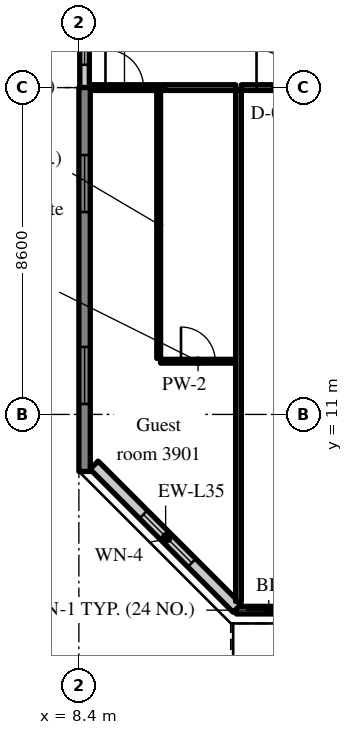
"""IFC4 building model, lengths in metres.
Left out: names, types, materials, properties, quantities, classifications, styles, units other than length and angle.
Written with IfcOpenShell. Run it as: python <this file> out.ifc"""

import sys

from ifc_helpers import new_model, si_unit, direction, frame, frame_2d, origin, place, context, subcontext, project, spatial, rectangle, extrude, source, transform, mapped, element, fill, save


model = new_model("IFC4")
c1 = context("Model", 3, precision=1e-05, world=origin(), true_north=direction((0.0, 1.0)))
c2 = subcontext(c1, "Body", "Model", "MODEL_VIEW")
j1 = project(units=[si_unit("LENGTHUNIT", "METRE"), si_unit("PLANEANGLEUNIT", "RADIAN")], contexts=[c1])
p1 = place(None, origin())
s1 = spatial("IfcSite", under=j1, at=p1, CompositionType="ELEMENT")
p2 = place(p1, origin())
s2 = spatial("IfcBuilding", under=s1, at=p2, CompositionType="ELEMENT")
p3 = place(p2, frame((0.0, 0.0, 163.0)))
s3 = spatial("IfcBuildingStorey", under=s2, at=p3, CompositionType="ELEMENT", Elevation=163.0)
m1 = source(origin(), c2, "Body", "SweptSolid", [
    extrude(rectangle(XDim=10.1, YDim=0.3, at=frame_2d((5.05, 0.0))), origin(), (0.0, 0.0, 1.0), 3.52),
])
p4 = place(p3, frame((8.55, 9.5, 0.0), z_axis=(0.0, 0.0, 1.0), x_axis=(0.0, 1.0, 0.0)))
e1 = element("IfcWall", 1, at=p4, inside=s3, PredefinedType="SHEAR", context=c2, shape_type="MappedRepresentation", body=[
    mapped(m1, transform((0.0, 0.0, 0.0), scale=1.0)),
])
m2 = source(origin(), c2, "Body", "SweptSolid", [
    extrude(rectangle(XDim=1.5, YDim=1.5, at=frame_2d((0.75, 0.75))), frame((0.0, 0.16, 0.0), z_axis=(0.0, -1.0, 0.0), x_axis=(1.0, 0.0, 0.0)), (0.0, 0.0, 1.0), 0.32),
])
p5 = place(p4, frame((1.775, 0.0, 0.9)))
e2 = element("IfcOpeningElement", 2, at=p5, cuts=e1, PredefinedType="OPENING", context=c2, shape_type="MappedRepresentation", body=[
    mapped(m2, transform((0.0, 0.0, 0.0), scale=1.0)),
])
p6 = place(p4, frame((6.825, 0.0, 0.9)))
e3 = element("IfcOpeningElement", 3, at=p6, cuts=e1, PredefinedType="OPENING", context=c2, shape_type="MappedRepresentation", body=[
    mapped(m2, transform((0.0, 0.0, 0.0), scale=1.0)),
])
m3 = source(origin(), c2, "Body", "SweptSolid", [
    extrude(rectangle(XDim=4.105, YDim=0.2, at=frame_2d((2.052, 0.0))), origin(), (0.0, 0.0, 1.0), 2.87),
])
p7 = place(p3, frame((12.545, 5.85, 0.0), z_axis=(0.0, 0.0, 1.0), x_axis=(1.0, 0.0, 0.0)))
e4 = element("IfcWall", 4, at=p7, inside=s3, PredefinedType="SOLIDWALL", context=c2, shape_type="MappedRepresentation", body=[
    mapped(m3, transform((0.0, 0.0, 0.0), scale=1.0)),
])
m4 = source(origin(), c2, "Body", "SweptSolid", [
    extrude(rectangle(XDim=1.2, YDim=2.4, at=frame_2d((0.6, 1.2))), frame((0.0, 0.11, 0.0), z_axis=(0.0, -1.0, 0.0), x_axis=(1.0, 0.0, 0.0)), (0.0, 0.0, 1.0), 0.22),
])
p8 = place(p7, frame((0.25, 0.0, 0.0)))
e5 = element("IfcOpeningElement", 5, at=p8, cuts=e4, PredefinedType="OPENING", context=c2, shape_type="MappedRepresentation", body=[
    mapped(m4, transform((0.0, 0.0, 0.0), scale=1.0)),
])
m5 = source(origin(), c2, "Body", "SweptSolid", [
    extrude(rectangle(XDim=1.5, YDim=1.5, at=frame_2d((0.75, 0.75))), frame((0.0, 0.11, 0.0), z_axis=(0.0, -1.0, 0.0), x_axis=(1.0, 0.0, 0.0)), (0.0, 0.0, 1.0), 0.22),
])
p9 = place(p7, frame((2.355, 0.0, 0.9)))
e6 = element("IfcOpeningElement", 6, at=p9, cuts=e4, PredefinedType="OPENING", context=c2, shape_type="MappedRepresentation", body=[
    mapped(m5, transform((0.0, 0.0, 0.0), scale=1.0)),
])
m6 = source(origin(), c2, "Body", "SweptSolid", [
    extrude(rectangle(XDim=5.326, YDim=0.3, at=frame_2d((2.663, 0.0))), origin(), (0.0, 0.0, 1.0), 3.52),
])
p10 = place(p3, frame((8.8, 9.666, 0.0), z_axis=(0.0, 0.0, 1.0), x_axis=(0.707083859269, -0.707129702361, 0.0)))
e7 = element("IfcWall", 7, at=p10, inside=s3, PredefinedType="SOLIDWALL", context=c2, shape_type="MappedRepresentation", body=[
    mapped(m6, transform((0.0, 0.0, 0.0), scale=1.0)),
])
m7 = source(origin(), c2, "Body", "SweptSolid", [
    extrude(rectangle(XDim=1.8, YDim=1.5, at=frame_2d((0.9, 0.75))), frame((0.0, 0.16, 0.0), z_axis=(0.0, -1.0, 0.0), x_axis=(1.0, 0.0, 0.0)), (0.0, 0.0, 1.0), 0.32),
])
p11 = place(p10, frame((1.836, 0.0, 0.9)))
e8 = element("IfcOpeningElement", 8, at=p11, cuts=e7, PredefinedType="OPENING", context=c2, shape_type="MappedRepresentation", body=[
    mapped(m7, transform((0.0, 0.0, 0.0), scale=1.0)),
])
m8 = source(origin(), c2, "Body", "SweptSolid", [
    extrude(rectangle(XDim=2.4, YDim=0.25, at=frame_2d((1.2, 0.0))), origin(), (0.0, 0.0, 1.0), 2.62),
])
p12 = place(p3, frame((8.55, 19.6, 0.0), z_axis=(0.0, 0.0, 1.0), x_axis=(0.0, 1.0, 0.0)))
e9 = element("IfcWall", 9, at=p12, inside=s3, PredefinedType="SOLIDWALL", context=c2, shape_type="MappedRepresentation", body=[
    mapped(m8, transform((0.0, 0.0, 0.0), scale=1.0)),
])
m9 = source(origin(), c2, "Body", "SweptSolid", [
    extrude(rectangle(XDim=1.2, YDim=1.5, at=frame_2d((0.6, 0.75))), frame((0.0, 0.135, 0.0), z_axis=(0.0, -1.0, 0.0), x_axis=(1.0, 0.0, 0.0)), (0.0, 0.0, 1.0), 0.27),
])
p13 = place(p12, frame((0.6, 0.0, 0.9)))
e10 = element("IfcOpeningElement", 10, at=p13, cuts=e9, PredefinedType="OPENING", context=c2, shape_type="MappedRepresentation", body=[
    mapped(m9, transform((0.0, 0.0, 0.0), scale=1.0)),
])
m10 = source(origin(), c2, "Body", "SweptSolid", [
    extrude(rectangle(XDim=7.05, YDim=0.1, at=frame_2d((3.525, 0.0))), origin(), (0.0, 0.0, 1.0), 3.52),
])
p14 = place(p3, frame((10.5, 12.475, 0.0), z_axis=(0.0, 0.0, 1.0), x_axis=(0.0, 1.0, 0.0)))
e11 = element("IfcWall", 11, at=p14, inside=s3, PredefinedType="PARTITIONING", context=c2, shape_type="MappedRepresentation", body=[
    mapped(m10, transform((0.0, 0.0, 0.0), scale=1.0)),
])
m11 = source(origin(), c2, "Body", "SweptSolid", [
    extrude(rectangle(XDim=1.975, YDim=0.1, at=frame_2d((0.987, 0.0))), origin(), (0.0, 0.0, 1.0), 3.52),
])
p15 = place(p3, frame((10.55, 12.4, 0.0), z_axis=(0.0, 0.0, 1.0), x_axis=(1.0, 0.0, 0.0)))
e12 = element("IfcWall", 12, at=p15, inside=s3, PredefinedType="PARTITIONING", context=c2, shape_type="MappedRepresentation", body=[
    mapped(m11, transform((0.0, 0.0, 0.0), scale=1.0)),
])
m12 = source(origin(), c2, "Body", "SweptSolid", [
    extrude(rectangle(XDim=0.9, YDim=2.1, at=frame_2d((0.45, 1.05))), frame((0.0, 0.06, 0.0), z_axis=(0.0, -1.0, 0.0), x_axis=(1.0, 0.0, 0.0)), (0.0, 0.0, 1.0), 0.12),
])
p16 = place(p15, frame((0.538, 0.0, 0.0)))
e13 = element("IfcOpeningElement", 13, at=p16, cuts=e12, PredefinedType="OPENING", context=c2, shape_type="MappedRepresentation", body=[
    mapped(m12, transform((0.0, 0.0, 0.0), scale=1.0)),
])
m13 = source(origin(), c2, "Body", "SweptSolid", [
    extrude(rectangle(XDim=3.825, YDim=0.15, at=frame_2d((1.913, 0.0))), origin(), (0.0, 0.0, 1.0), 2.82),
])
p17 = place(p3, frame((8.7, 19.6, 0.0), z_axis=(0.0, 0.0, 1.0), x_axis=(1.0, 0.0, 0.0)))
e14 = element("IfcWall", 14, at=p17, inside=s3, PredefinedType="PARTITIONING", context=c2, shape_type="MappedRepresentation", body=[
    mapped(m13, transform((0.0, 0.0, 0.0), scale=1.0)),
])
m14 = source(origin(), c2, "Body", "SweptSolid", [
    extrude(rectangle(XDim=1.0, YDim=2.1, at=frame_2d((0.5, 1.05))), frame((0.0, 0.085, 0.0), z_axis=(0.0, -1.0, 0.0), x_axis=(1.0, 0.0, 0.0)), (0.0, 0.0, 1.0), 0.17),
])
p18 = place(p17, frame((0.4, 0.0, 0.0)))
e15 = element("IfcOpeningElement", 15, at=p18, cuts=e14, PredefinedType="OPENING", context=c2, shape_type="MappedRepresentation", body=[
    mapped(m14, transform((0.0, 0.0, 0.0), scale=1.0)),
])
m15 = source(origin(), c2, "Body", "SweptSolid", [
    extrude(rectangle(XDim=3.975, YDim=0.15, at=frame_2d((1.987, 0.0))), origin(), (0.0, 0.0, 1.0), 2.82),
])
p19 = place(p3, frame((12.675, 19.6, 0.0), z_axis=(0.0, 0.0, 1.0), x_axis=(1.0, 0.0, 0.0)))
e16 = element("IfcWall", 16, at=p19, inside=s3, PredefinedType="PARTITIONING", context=c2, shape_type="MappedRepresentation", body=[
    mapped(m15, transform((0.0, 0.0, 0.0), scale=1.0)),
])
p20 = place(p19, frame((0.4, 0.0, 0.0)))
e17 = element("IfcOpeningElement", 17, at=p20, cuts=e16, PredefinedType="OPENING", context=c2, shape_type="MappedRepresentation", body=[
    mapped(m14, transform((0.0, 0.0, 0.0), scale=1.0)),
])
m16 = source(origin(), c2, "Body", "SweptSolid", [
    extrude(rectangle(XDim=13.447, YDim=0.15, at=frame_2d((6.724, 0.0))), origin(), (0.0, 0.0, 1.0), 3.52),
])
p21 = place(p3, frame((12.6, 6.078, 0.0), z_axis=(0.0, 0.0, 1.0), x_axis=(0.0, 1.0, 0.0)))
e18 = element("IfcWall", 18, at=p21, inside=s3, PredefinedType="PARTITIONING", context=c2, shape_type="MappedRepresentation", body=[
    mapped(m16, transform((0.0, 0.0, 0.0), scale=1.0)),
])
m17 = source(origin(), c2, "Body", "SweptSolid", [
    extrude(rectangle(XDim=1.2, YDim=2.4, at=frame_2d((0.6, 1.2))), frame((0.0, 0.025, 0.0), z_axis=(0.0, -1.0, 0.0), x_axis=(1.0, 0.0, 0.0)), (0.0, 0.0, 1.0), 0.05),
])
p22 = place(p8, origin())
e19 = element("IfcDoor", 19, at=p22, inside=s3, OperationType="SLIDING_TO_LEFT", PredefinedType="DOOR", context=c2, shape_type="MappedRepresentation", body=[
    mapped(m17, transform((0.0, 0.0, 0.0), scale=1.0)),
])
fill(e5, e19)
m18 = source(origin(), c2, "Body", "SweptSolid", [
    extrude(rectangle(XDim=1.8, YDim=1.5, at=frame_2d((0.9, 0.75))), frame((0.0, 0.03, 0.0), z_axis=(0.0, -1.0, 0.0), x_axis=(1.0, 0.0, 0.0)), (0.0, 0.0, 1.0), 0.06),
])
p23 = place(p11, origin())
e20 = element("IfcWindow", 20, at=p23, inside=s3, PartitioningType="SINGLE_PANEL", PredefinedType="WINDOW", context=c2, shape_type="MappedRepresentation", body=[
    mapped(m18, transform((0.0, 0.0, 0.0), scale=1.0)),
])
fill(e8, e20)
m19 = source(origin(), c2, "Body", "SweptSolid", [
    extrude(rectangle(XDim=1.5, YDim=1.5, at=frame_2d((0.75, 0.75))), frame((0.0, 0.03, 0.0), z_axis=(0.0, -1.0, 0.0), x_axis=(1.0, 0.0, 0.0)), (0.0, 0.0, 1.0), 0.06),
])
p24 = place(p5, origin())
e21 = element("IfcWindow", 21, at=p24, inside=s3, PartitioningType="SINGLE_PANEL", PredefinedType="WINDOW", context=c2, shape_type="MappedRepresentation", body=[
    mapped(m19, transform((0.0, 0.0, 0.0), scale=1.0)),
])
fill(e2, e21)
p25 = place(p6, origin())
e22 = element("IfcWindow", 22, at=p25, inside=s3, PartitioningType="SINGLE_PANEL", PredefinedType="WINDOW", context=c2, shape_type="MappedRepresentation", body=[
    mapped(m19, transform((0.0, 0.0, 0.0), scale=1.0)),
])
fill(e3, e22)
m20 = source(origin(), c2, "Body", "SweptSolid", [
    extrude(rectangle(XDim=1.2, YDim=1.5, at=frame_2d((0.6, 0.75))), frame((0.0, 0.03, 0.0), z_axis=(0.0, -1.0, 0.0), x_axis=(1.0, 0.0, 0.0)), (0.0, 0.0, 1.0), 0.06),
])
p26 = place(p13, origin())
e23 = element("IfcWindow", 23, at=p26, inside=s3, PartitioningType="SINGLE_PANEL", PredefinedType="WINDOW", context=c2, shape_type="MappedRepresentation", body=[
    mapped(m20, transform((0.0, 0.0, 0.0), scale=1.0)),
])
fill(e10, e23)
m21 = source(origin(), c2, "Body", "SweptSolid", [
    extrude(rectangle(XDim=0.9, YDim=2.1, at=frame_2d((0.45, 1.05))), frame((0.0, 0.025, 0.0), z_axis=(0.0, -1.0, 0.0), x_axis=(1.0, 0.0, 0.0)), (0.0, 0.0, 1.0), 0.05),
])
p27 = place(p16, origin())
e24 = element("IfcDoor", 24, at=p27, inside=s3, OperationType="SINGLE_SWING_LEFT", PredefinedType="DOOR", context=c2, shape_type="MappedRepresentation", body=[
    mapped(m21, transform((0.0, 0.0, 0.0), scale=1.0)),
])
fill(e13, e24)
m22 = source(origin(), c2, "Body", "SweptSolid", [
    extrude(rectangle(XDim=1.0, YDim=2.1, at=frame_2d((0.5, 1.05))), frame((0.0, 0.025, 0.0), z_axis=(0.0, -1.0, 0.0), x_axis=(1.0, 0.0, 0.0)), (0.0, 0.0, 1.0), 0.05),
])
p28 = place(p18, origin())
e25 = element("IfcDoor", 25, at=p28, inside=s3, OperationType="SINGLE_SWING_LEFT", PredefinedType="DOOR", context=c2, shape_type="MappedRepresentation", body=[
    mapped(m22, transform((0.0, 0.0, 0.0), scale=1.0)),
])
fill(e15, e25)
p29 = place(p20, origin())
e26 = element("IfcDoor", 26, at=p29, inside=s3, OperationType="SINGLE_SWING_LEFT", PredefinedType="DOOR", context=c2, shape_type="MappedRepresentation", body=[
    mapped(m22, transform((0.0, 0.0, 0.0), scale=1.0)),
])
fill(e17, e26)
save(model, sys.argv[1])
